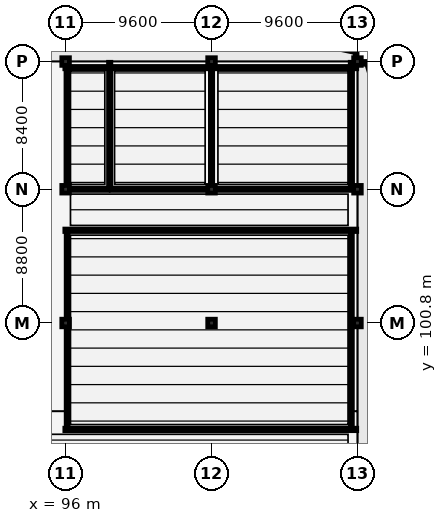
"""IFC4 building model, lengths in metres.
Left out: names, types, materials, properties, quantities, classifications, styles, units other than length and angle.
Written with IfcOpenShell. Run it as: python <this file> out.ifc"""

import sys

from ifc_helpers import new_model, si_unit, direction, frame, frame_2d, origin, origin_2d, place, context, subcontext, project, spatial, rectangle, extrude, element, fill, save


model = new_model("IFC4")
c1 = context("Model", 3, precision=1e-05, world=origin(), true_north=direction((0.0, 1.0)))
c2 = subcontext(c1, "Body", "Model", "MODEL_VIEW")
j1 = project(units=[si_unit("LENGTHUNIT", "METRE"), si_unit("PLANEANGLEUNIT", "RADIAN")], contexts=[c1])
p1 = place(None, origin())
s1 = spatial("IfcSite", under=j1, at=p1, CompositionType="ELEMENT")
p2 = place(p1, origin())
s2 = spatial("IfcBuilding", under=s1, at=p2, CompositionType="ELEMENT")
p3 = place(p2, frame((0.0, 0.0, 9.6)))
s3 = spatial("IfcBuildingStorey", under=s2, at=p3, CompositionType="ELEMENT", Elevation=9.6)
for number, where, z_axis, x_axis in (
    (1, (96.0, 100.8, 0.0), (0.0, 0.0, 1.0), (1.0, 0.0, 0.0)),
    (2, (96.0, 109.6, 0.0), (0.0, 0.0, 1.0), (1.0, 0.0, 0.0)),
    (3, (96.0, 118.0, 0.0), (0.0, 0.0, 1.0), (1.0, 0.0, 0.0)),
    (4, (105.6, 100.8, 0.0), (0.0, 0.0, 1.0), (1.0, 0.0, 0.0)),
    (5, (105.6, 109.6, 0.0), (0.0, 0.0, 1.0), (1.0, 0.0, 0.0)),
    (6, (105.6, 118.0, 0.0), (0.0, 0.0, 1.0), (1.0, 0.0, 0.0)),
    (7, (115.2, 100.8, 0.0), (0.0, 0.0, 1.0), (1.0, 0.0, 0.0)),
    (8, (115.2, 109.6, 0.0), (0.0, 0.0, 1.0), (1.0, 0.0, 0.0)),
    (9, (115.2, 118.0, 0.0), (0.0, 0.0, 1.0), (1.0, 0.0, 0.0)),
):
    element("IfcColumn", number, at=place(p3, frame(where, z_axis=z_axis, x_axis=x_axis)), inside=s3, PredefinedType="COLUMN", context=c2, shape_type="SweptSolid", body=[
        extrude(rectangle(XDim=0.5, YDim=0.5, at=origin_2d()), origin(), (0.0, 0.0, 1.0), 4.5),
    ])
p4 = place(p3, frame((95.95, 93.8, 0.0), z_axis=(0.0, 0.0, 1.0), x_axis=(1.0, 0.0, 0.0)))
e10 = element("IfcWall", 10, at=p4, inside=s3, PredefinedType="PARTITIONING", context=c2, shape_type="SweptSolid", body=[
    extrude(rectangle(XDim=19.2, YDim=0.16, at=frame_2d((9.6, 0.0))), origin(), (0.0, 0.0, 1.0), 3.4),
])
p5 = place(p4, frame((9.025, 0.0, 0.0)))
e11 = element("IfcOpeningElement", 11, at=p5, cuts=e10, PredefinedType="OPENING", context=c2, shape_type="SweptSolid", body=[
    extrude(rectangle(XDim=1.15, YDim=2.2, at=frame_2d((0.575, 1.1))), frame((0.0, 0.09, 0.0), z_axis=(0.0, -1.0, 0.0), x_axis=(1.0, 0.0, 0.0)), (0.0, 0.0, 1.0), 0.18),
])
p6 = place(p3, frame((95.95, 106.9, 0.0), z_axis=(0.0, 0.0, 1.0), x_axis=(1.0, 0.0, 0.0)))
e12 = element("IfcWall", 12, at=p6, inside=s3, PredefinedType="PARTITIONING", context=c2, shape_type="SweptSolid", body=[
    extrude(rectangle(XDim=19.2, YDim=0.16, at=frame_2d((9.6, 0.0))), origin(), (0.0, 0.0, 1.0), 3.4),
])
p7 = place(p6, frame((9.025, 0.0, 0.0)))
e13 = element("IfcOpeningElement", 13, at=p7, cuts=e12, PredefinedType="OPENING", context=c2, shape_type="SweptSolid", body=[
    extrude(rectangle(XDim=1.15, YDim=2.2, at=frame_2d((0.575, 1.1))), frame((0.0, 0.09, 0.0), z_axis=(0.0, -1.0, 0.0), x_axis=(1.0, 0.0, 0.0)), (0.0, 0.0, 1.0), 0.18),
])
p8 = place(p3, frame((95.95, 109.6, 0.0), z_axis=(0.0, 0.0, 1.0), x_axis=(1.0, 0.0, 0.0)))
e14 = element("IfcWall", 14, at=p8, inside=s3, PredefinedType="PARTITIONING", context=c2, shape_type="SweptSolid", body=[
    extrude(rectangle(XDim=2.85, YDim=0.15, at=frame_2d((1.425, 0.0))), origin(), (0.0, 0.0, 1.0), 3.4),
])
p9 = place(p8, frame((1.304, 0.0, 0.0)))
e15 = element("IfcOpeningElement", 15, at=p9, cuts=e14, PredefinedType="OPENING", context=c2, shape_type="SweptSolid", body=[
    extrude(rectangle(XDim=0.95, YDim=2.15, at=frame_2d((0.475, 1.075))), frame((0.0, 0.085, 0.0), z_axis=(0.0, -1.0, 0.0), x_axis=(1.0, 0.0, 0.0)), (0.0, 0.0, 1.0), 0.17),
])
p10 = place(p3, frame((99.0, 109.6, 0.0), z_axis=(0.0, 0.0, 1.0), x_axis=(1.0, 0.0, 0.0)))
e16 = element("IfcWall", 16, at=p10, inside=s3, PredefinedType="PARTITIONING", context=c2, shape_type="SweptSolid", body=[
    extrude(rectangle(XDim=6.4, YDim=0.15, at=frame_2d((3.2, 0.0))), origin(), (0.0, 0.0, 1.0), 3.4),
])
p11 = place(p10, frame((2.75, 0.0, 0.0)))
e17 = element("IfcOpeningElement", 17, at=p11, cuts=e16, PredefinedType="OPENING", context=c2, shape_type="SweptSolid", body=[
    extrude(rectangle(XDim=0.9, YDim=2.15, at=frame_2d((0.45, 1.075))), frame((0.0, 0.085, 0.0), z_axis=(0.0, -1.0, 0.0), x_axis=(1.0, 0.0, 0.0)), (0.0, 0.0, 1.0), 0.17),
])
p12 = place(p3, frame((105.8, 109.6, 0.0), z_axis=(0.0, 0.0, 1.0), x_axis=(1.0, 0.0, 0.0)))
e18 = element("IfcWall", 18, at=p12, inside=s3, PredefinedType="PARTITIONING", context=c2, shape_type="SweptSolid", body=[
    extrude(rectangle(XDim=9.35, YDim=0.15, at=frame_2d((4.675, 0.0))), origin(), (0.0, 0.0, 1.0), 3.4),
])
p13 = place(p12, frame((4.225, 0.0, 0.0)))
e19 = element("IfcOpeningElement", 19, at=p13, cuts=e18, PredefinedType="OPENING", context=c2, shape_type="SweptSolid", body=[
    extrude(rectangle(XDim=0.9, YDim=2.15, at=frame_2d((0.45, 1.075))), frame((0.0, 0.085, 0.0), z_axis=(0.0, -1.0, 0.0), x_axis=(1.0, 0.0, 0.0)), (0.0, 0.0, 1.0), 0.17),
])
for number, where, z_axis, x_axis in (
    (20, (98.9, 109.7, 0.0), (0.0, 0.0, 1.0), (0.0, 1.0, 0.0)),
    (21, (105.6, 109.7, 0.0), (0.0, 0.0, 1.0), (0.0, 1.0, 0.0)),
):
    element("IfcWall", number, at=place(p3, frame(where, z_axis=z_axis, x_axis=x_axis)), inside=s3, PredefinedType="PARTITIONING", context=c2, shape_type="SweptSolid", body=[
        extrude(rectangle(XDim=8.25, YDim=0.15, at=frame_2d((4.125, 0.0))), origin(), (0.0, 0.0, 1.0), 3.4),
    ])
for number, where, z_axis, x_axis in (
    (22, (96.1, 94.04, 0.0), (0.0, 0.0, 1.0), (0.0, 1.0, 0.0)),
    (23, (114.8, 94.04, 0.0), (0.0, 0.0, 1.0), (0.0, 1.0, 0.0)),
):
    element("IfcWall", number, at=place(p3, frame(where, z_axis=z_axis, x_axis=x_axis)), inside=s3, PredefinedType="PARTITIONING", context=c2, shape_type="SweptSolid", body=[
        extrude(rectangle(XDim=12.62, YDim=0.125, at=frame_2d((6.31, 0.0))), origin(), (0.0, 0.0, 1.0), 3.4),
    ])
p14 = place(p3, frame((95.95, 117.6, 0.0), z_axis=(0.0, 0.0, 1.0), x_axis=(1.0, 0.0, 0.0)))
e24 = element("IfcWall", 24, at=p14, inside=s3, PredefinedType="PARTITIONING", context=c2, shape_type="SweptSolid", body=[
    extrude(rectangle(XDim=2.71, YDim=0.15, at=frame_2d((1.355, 0.0))), origin(), (0.0, 0.0, 1.0), 3.4),
])
p15 = place(p3, frame((96.1, 109.84, 0.0), z_axis=(0.0, 0.0, 1.0), x_axis=(0.0, 1.0, 0.0)))
e25 = element("IfcWall", 25, at=p15, inside=s3, PredefinedType="PARTITIONING", context=c2, shape_type="SweptSolid", body=[
    extrude(rectangle(XDim=8.11, YDim=0.15, at=frame_2d((4.055, 0.0))), origin(), (0.0, 0.0, 1.0), 3.4),
])
p16 = place(p3, frame((99.14, 117.6, 0.0), z_axis=(0.0, 0.0, 1.0), x_axis=(1.0, 0.0, 0.0)))
e26 = element("IfcWall", 26, at=p16, inside=s3, PredefinedType="PARTITIONING", context=c2, shape_type="SweptSolid", body=[
    extrude(rectangle(XDim=6.12, YDim=0.15, at=frame_2d((3.06, 0.0))), origin(), (0.0, 0.0, 1.0), 3.4),
])
p17 = place(p3, frame((105.94, 117.6, 0.0), z_axis=(0.0, 0.0, 1.0), x_axis=(1.0, 0.0, 0.0)))
e27 = element("IfcWall", 27, at=p17, inside=s3, PredefinedType="PARTITIONING", context=c2, shape_type="SweptSolid", body=[
    extrude(rectangle(XDim=9.21, YDim=0.15, at=frame_2d((4.605, 0.0))), origin(), (0.0, 0.0, 1.0), 3.4),
])
p18 = place(p3, frame((114.8, 109.84, 0.0), z_axis=(0.0, 0.0, 1.0), x_axis=(0.0, 1.0, 0.0)))
e28 = element("IfcWall", 28, at=p18, inside=s3, PredefinedType="PARTITIONING", context=c2, shape_type="SweptSolid", body=[
    extrude(rectangle(XDim=8.11, YDim=0.15, at=frame_2d((4.055, 0.0))), origin(), (0.0, 0.0, 1.0), 3.4),
])
p19 = place(p5, origin())
e29 = element("IfcDoor", 29, at=p19, inside=s3, OperationType="SINGLE_SWING_RIGHT", PredefinedType="DOOR", context=c2, shape_type="SweptSolid", body=[
    extrude(rectangle(XDim=1.15, YDim=2.2, at=frame_2d((0.575, 1.1))), frame((0.0, 0.025, 0.0), z_axis=(0.0, -1.0, 0.0), x_axis=(1.0, 0.0, 0.0)), (0.0, 0.0, 1.0), 0.05),
])
fill(e11, e29)
p20 = place(p7, origin())
e30 = element("IfcDoor", 30, at=p20, inside=s3, OperationType="SINGLE_SWING_RIGHT", PredefinedType="DOOR", context=c2, shape_type="SweptSolid", body=[
    extrude(rectangle(XDim=1.15, YDim=2.2, at=frame_2d((0.575, 1.1))), frame((0.0, 0.025, 0.0), z_axis=(0.0, -1.0, 0.0), x_axis=(1.0, 0.0, 0.0)), (0.0, 0.0, 1.0), 0.05),
])
fill(e13, e30)
p21 = place(p9, origin())
e31 = element("IfcDoor", 31, at=p21, inside=s3, OperationType="SINGLE_SWING_LEFT", PredefinedType="DOOR", context=c2, shape_type="SweptSolid", body=[
    extrude(rectangle(XDim=0.95, YDim=2.15, at=frame_2d((0.475, 1.075))), frame((0.0, 0.025, 0.0), z_axis=(0.0, -1.0, 0.0), x_axis=(1.0, 0.0, 0.0)), (0.0, 0.0, 1.0), 0.05),
])
fill(e15, e31)
p22 = place(p11, origin())
e32 = element("IfcDoor", 32, at=p22, inside=s3, OperationType="SINGLE_SWING_RIGHT", PredefinedType="DOOR", context=c2, shape_type="SweptSolid", body=[
    extrude(rectangle(XDim=0.9, YDim=2.15, at=frame_2d((0.45, 1.075))), frame((0.0, 0.025, 0.0), z_axis=(0.0, -1.0, 0.0), x_axis=(1.0, 0.0, 0.0)), (0.0, 0.0, 1.0), 0.05),
])
fill(e17, e32)
p23 = place(p13, origin())
e33 = element("IfcDoor", 33, at=p23, inside=s3, OperationType="SINGLE_SWING_LEFT", PredefinedType="DOOR", context=c2, shape_type="SweptSolid", body=[
    extrude(rectangle(XDim=0.9, YDim=2.15, at=frame_2d((0.45, 1.075))), frame((0.0, 0.025, 0.0), z_axis=(0.0, -1.0, 0.0), x_axis=(1.0, 0.0, 0.0)), (0.0, 0.0, 1.0), 0.05),
])
fill(e19, e33)
save(model, sys.argv[1])
